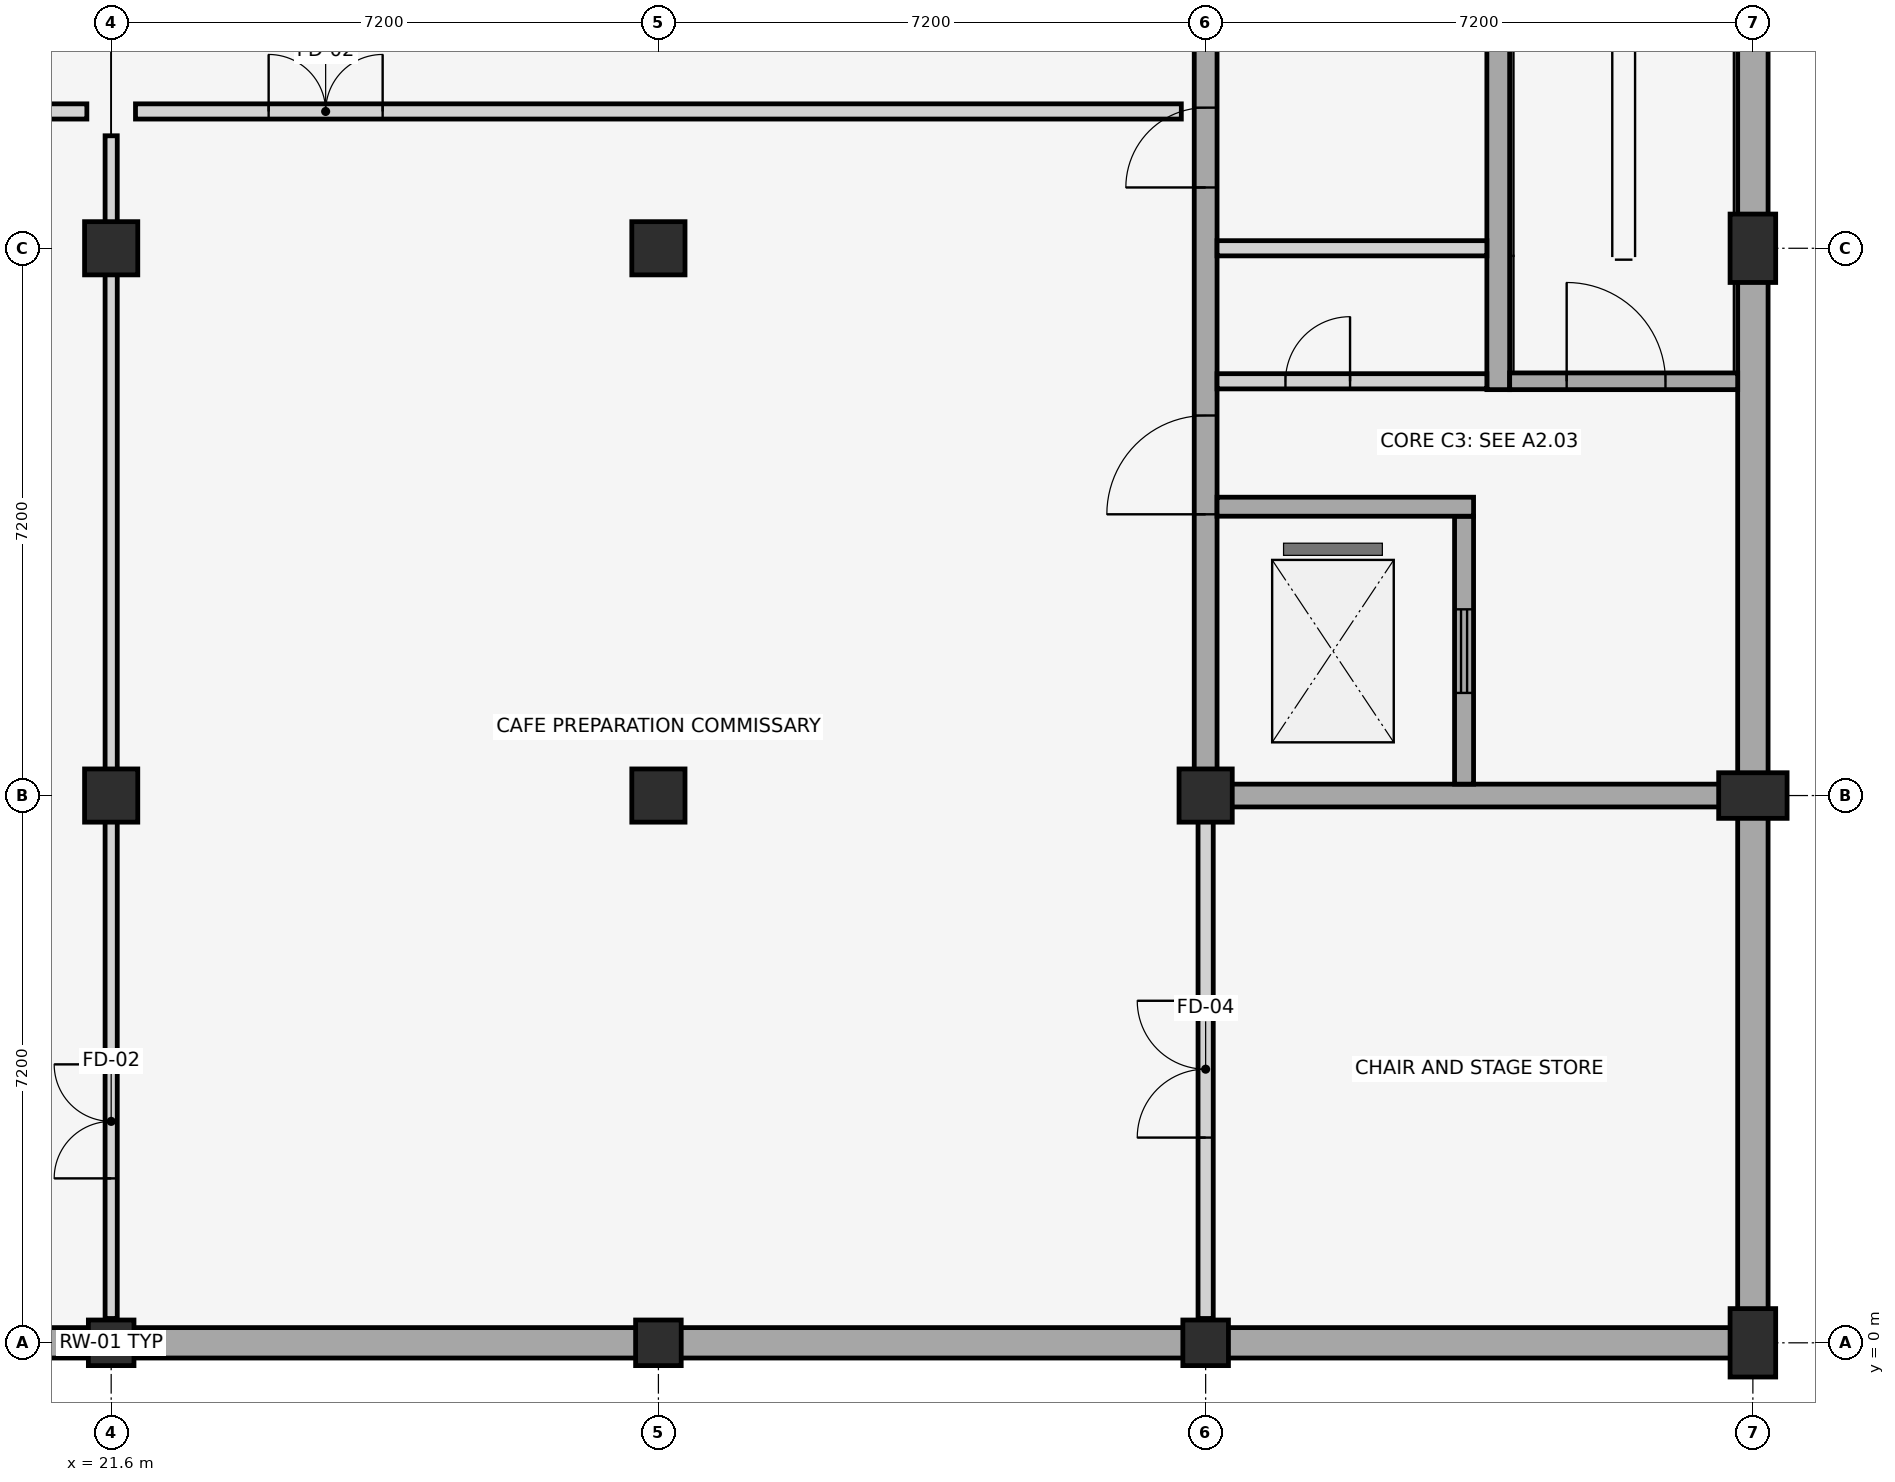
"""IFC4 building model, lengths in metres.
Left out: names, types, materials, properties, quantities, classifications, styles, units other than length and angle.
Written with IfcOpenShell. Run it as: python <this file> out.ifc"""

import sys

from ifc_helpers import new_model, si_unit, direction, frame, frame_2d, origin, origin_2d, place, context, subcontext, project, spatial, rectangle, extrude, element, fill, save


model = new_model("IFC4")
c1 = context("Model", 3, precision=1e-05, world=origin(), true_north=direction((0.0, 1.0)))
c2 = subcontext(c1, "Body", "Model", "MODEL_VIEW")
j1 = project(units=[si_unit("LENGTHUNIT", "METRE"), si_unit("PLANEANGLEUNIT", "RADIAN")], contexts=[c1])
p1 = place(None, origin())
s1 = spatial("IfcSite", under=j1, at=p1, CompositionType="ELEMENT")
p2 = place(p1, origin())
s2 = spatial("IfcBuilding", under=s1, at=p2, CompositionType="ELEMENT")
p3 = place(p2, frame((0.0, 0.0, -4.5)))
s3 = spatial("IfcBuildingStorey", under=s2, at=p3, CompositionType="ELEMENT", Elevation=-4.5)
p4 = place(p3, frame((-0.2, 0.0, 0.0), z_axis=(0.0, 0.0, 1.0), x_axis=(1.0, 0.0, 0.0)))
e1 = element("IfcWall", 1, at=p4, inside=s3, PredefinedType="USERDEFINED", context=c2, shape_type="SweptSolid", body=[
    extrude(rectangle(XDim=43.6, YDim=0.4, at=frame_2d((21.8, 0.0))), origin(), (0.0, 0.0, 1.0), 3.67),
])
p5 = place(p3, frame((43.2, 0.2, 0.0), z_axis=(0.0, 0.0, 1.0), x_axis=(0.0, 1.0, 0.0)))
e2 = element("IfcWall", 2, at=p5, inside=s3, PredefinedType="USERDEFINED", context=c2, shape_type="SweptSolid", body=[
    extrude(rectangle(XDim=28.4, YDim=0.4, at=frame_2d((14.2, 0.0))), origin(), (0.0, 0.0, 1.0), 3.67),
])
p6 = place(p3, frame((21.6, 0.0, -0.45), z_axis=(0.0, 0.0, 1.0), x_axis=(0.0, 1.0, 0.0)))
e3 = element("IfcColumn", 3, at=p6, inside=s3, PredefinedType="COLUMN", context=c2, shape_type="SweptSolid", body=[
    extrude(rectangle(XDim=0.6, YDim=0.6, at=origin_2d()), origin(), (0.0, 0.0, 1.0), 4.95),
])
for number, where, z_axis, x_axis in (
    (4, (21.6, 7.2, -0.45), (0.0, 0.0, 1.0), (1.0, 0.0, 0.0)),
    (5, (21.6, 14.4, -0.45), (0.0, 0.0, 1.0), (0.0, 1.0, 0.0)),
):
    element("IfcColumn", number, at=place(p3, frame(where, z_axis=z_axis, x_axis=x_axis)), inside=s3, PredefinedType="COLUMN", context=c2, shape_type="SweptSolid", body=[
        extrude(rectangle(XDim=0.7, YDim=0.7, at=origin_2d()), origin(), (0.0, 0.0, 1.0), 4.95),
    ])
p7 = place(p3, frame((28.8, 0.0, -0.45), z_axis=(0.0, 0.0, 1.0), x_axis=(1.0, 0.0, 0.0)))
e6 = element("IfcColumn", 6, at=p7, inside=s3, PredefinedType="COLUMN", context=c2, shape_type="SweptSolid", body=[
    extrude(rectangle(XDim=0.6, YDim=0.6, at=origin_2d()), origin(), (0.0, 0.0, 1.0), 4.95),
])
for number, where, z_axis, x_axis in (
    (7, (28.8, 7.2, -0.45), (0.0, 0.0, 1.0), (0.0, 1.0, 0.0)),
    (8, (28.8, 14.4, -0.45), (0.0, 0.0, 1.0), (1.0, 0.0, 0.0)),
):
    element("IfcColumn", number, at=place(p3, frame(where, z_axis=z_axis, x_axis=x_axis)), inside=s3, PredefinedType="COLUMN", context=c2, shape_type="SweptSolid", body=[
        extrude(rectangle(XDim=0.7, YDim=0.7, at=origin_2d()), origin(), (0.0, 0.0, 1.0), 4.95),
    ])
p8 = place(p3, frame((36.0, 0.0, -0.45), z_axis=(0.0, 0.0, 1.0), x_axis=(0.0, 1.0, 0.0)))
e9 = element("IfcColumn", 9, at=p8, inside=s3, PredefinedType="COLUMN", context=c2, shape_type="SweptSolid", body=[
    extrude(rectangle(XDim=0.6, YDim=0.6, at=origin_2d()), origin(), (0.0, 0.0, 1.0), 4.95),
])
p9 = place(p3, frame((36.0, 7.2, -0.45), z_axis=(0.0, 0.0, 1.0), x_axis=(1.0, 0.0, 0.0)))
e10 = element("IfcColumn", 10, at=p9, inside=s3, PredefinedType="COLUMN", context=c2, shape_type="SweptSolid", body=[
    extrude(rectangle(XDim=0.7, YDim=0.7, at=origin_2d()), origin(), (0.0, 0.0, 1.0), 4.95),
])
for number, where, z_axis, x_axis in (
    (11, (43.2, 0.0, -0.45), (0.0, 0.0, 1.0), (1.0, 0.0, 0.0)),
    (12, (43.2, 7.2, -0.45), (0.0, 0.0, 1.0), (0.0, 1.0, 0.0)),
    (13, (43.2, 14.4, -0.45), (0.0, 0.0, 1.0), (1.0, 0.0, 0.0)),
):
    element("IfcColumn", number, at=place(p3, frame(where, z_axis=z_axis, x_axis=x_axis)), inside=s3, PredefinedType="PILASTER", context=c2, shape_type="SweptSolid", body=[
        extrude(rectangle(XDim=0.6, YDim=0.9, at=origin_2d()), origin(), (0.0, 0.0, 1.0), 4.95),
    ])
p10 = place(p3, frame((35.85, 7.2, 0.0), z_axis=(0.0, 0.0, 1.0), x_axis=(1.0, 0.0, 0.0)))
e14 = element("IfcWall", 14, at=p10, inside=s3, PredefinedType="SHEAR", context=c2, shape_type="SweptSolid", body=[
    extrude(rectangle(XDim=7.15, YDim=0.3, at=frame_2d((3.575, 0.0))), origin(), (0.0, 0.0, 1.0), 4.25),
])
p11 = place(p3, frame((36.0, 7.35, 0.0), z_axis=(0.0, 0.0, 1.0), x_axis=(0.0, 1.0, 0.0)))
e15 = element("IfcWall", 15, at=p11, inside=s3, PredefinedType="SHEAR", context=c2, shape_type="SweptSolid", body=[
    extrude(rectangle(XDim=14.1, YDim=0.3, at=frame_2d((7.05, 0.0))), origin(), (0.0, 0.0, 1.0), 4.25),
])
p12 = place(p11, frame((3.55, 0.0, 0.0)))
e16 = element("IfcOpeningElement", 16, at=p12, cuts=e15, PredefinedType="OPENING", context=c2, shape_type="SweptSolid", body=[
    extrude(rectangle(XDim=1.3, YDim=2.2, at=frame_2d((0.65, 1.1))), frame((0.0, 0.16, 0.0), z_axis=(0.0, -1.0, 0.0), x_axis=(1.0, 0.0, 0.0)), (0.0, 0.0, 1.0), 0.32),
])
p13 = place(p11, frame((7.85, 0.0, 0.0)))
e17 = element("IfcOpeningElement", 17, at=p13, cuts=e15, PredefinedType="OPENING", context=c2, shape_type="SweptSolid", body=[
    extrude(rectangle(XDim=1.05, YDim=2.15, at=frame_2d((0.525, 1.075))), frame((0.0, 0.16, 0.0), z_axis=(0.0, -1.0, 0.0), x_axis=(1.0, 0.0, 0.0)), (0.0, 0.0, 1.0), 0.32),
])
p14 = place(p11, frame((10.55, 0.0, 0.0)))
e18 = element("IfcOpeningElement", 18, at=p14, cuts=e15, PredefinedType="OPENING", context=c2, shape_type="SweptSolid", body=[
    extrude(rectangle(XDim=1.0, YDim=2.15, at=frame_2d((0.5, 1.075))), frame((0.0, 0.16, 0.0), z_axis=(0.0, -1.0, 0.0), x_axis=(1.0, 0.0, 0.0)), (0.0, 0.0, 1.0), 0.32),
])
p15 = place(p3, frame((39.4, 7.35, 0.0), z_axis=(0.0, 0.0, 1.0), x_axis=(0.0, 1.0, 0.0)))
e19 = element("IfcWall", 19, at=p15, inside=s3, PredefinedType="SHEAR", context=c2, shape_type="SweptSolid", body=[
    extrude(rectangle(XDim=3.525, YDim=0.25, at=frame_2d((1.762, 0.0))), origin(), (0.0, 0.0, 1.0), 4.25),
])
p16 = place(p15, frame((1.2, 0.0, 0.0)))
e20 = element("IfcOpeningElement", 20, at=p16, cuts=e19, PredefinedType="OPENING", context=c2, shape_type="SweptSolid", body=[
    extrude(rectangle(XDim=1.1, YDim=2.15, at=frame_2d((0.55, 1.075))), frame((0.0, 0.135, 0.0), z_axis=(0.0, -1.0, 0.0), x_axis=(1.0, 0.0, 0.0)), (0.0, 0.0, 1.0), 0.27),
])
p17 = place(p3, frame((39.85, 12.54, 0.0), z_axis=(0.0, 0.0, 1.0), x_axis=(0.0, 1.0, 0.0)))
e21 = element("IfcWall", 21, at=p17, inside=s3, PredefinedType="SHEAR", context=c2, shape_type="SweptSolid", body=[
    extrude(rectangle(XDim=8.91, YDim=0.3, at=frame_2d((4.455, 0.0))), origin(), (0.0, 0.0, 1.0), 4.25),
])
p18 = place(p3, frame((36.15, 12.65, 0.0), z_axis=(0.0, 0.0, 1.0), x_axis=(1.0, 0.0, 0.0)))
e22 = element("IfcWall", 22, at=p18, inside=s3, PredefinedType="PLUMBINGWALL", context=c2, shape_type="SweptSolid", body=[
    extrude(rectangle(XDim=3.55, YDim=0.2, at=frame_2d((1.775, 0.0))), origin(), (0.0, 0.0, 1.0), 3.67),
])
p19 = place(p18, frame((0.9, 0.0, 0.0)))
e23 = element("IfcOpeningElement", 23, at=p19, cuts=e22, PredefinedType="OPENING", context=c2, shape_type="SweptSolid", body=[
    extrude(rectangle(XDim=0.85, YDim=2.05, at=frame_2d((0.425, 1.025))), frame((0.0, 0.11, 0.0), z_axis=(0.0, -1.0, 0.0), x_axis=(1.0, 0.0, 0.0)), (0.0, 0.0, 1.0), 0.22),
])
p20 = place(p3, frame((40.0, 12.65, 0.0), z_axis=(0.0, 0.0, 1.0), x_axis=(1.0, 0.0, 0.0)))
e24 = element("IfcWall", 24, at=p20, inside=s3, PredefinedType="SHEAR", context=c2, shape_type="SweptSolid", body=[
    extrude(rectangle(XDim=3.0, YDim=0.22, at=frame_2d((1.5, 0.0))), origin(), (0.0, 0.0, 1.0), 4.25),
])
p21 = place(p20, frame((0.75, 0.0, 0.0)))
e25 = element("IfcOpeningElement", 25, at=p21, cuts=e24, PredefinedType="OPENING", context=c2, shape_type="SweptSolid", body=[
    extrude(rectangle(XDim=1.3, YDim=2.2, at=frame_2d((0.65, 1.1))), frame((0.0, 0.12, 0.0), z_axis=(0.0, -1.0, 0.0), x_axis=(1.0, 0.0, 0.0)), (0.0, 0.0, 1.0), 0.24),
])
p22 = place(p3, frame((36.15, 11.0, 0.0), z_axis=(0.0, 0.0, 1.0), x_axis=(1.0, 0.0, 0.0)))
e26 = element("IfcWall", 26, at=p22, inside=s3, PredefinedType="SHEAR", context=c2, shape_type="SweptSolid", body=[
    extrude(rectangle(XDim=3.375, YDim=0.25, at=frame_2d((1.688, 0.0))), origin(), (0.0, 0.0, 1.0), 4.25),
])
p23 = place(p3, frame((36.15, 14.4, 0.0), z_axis=(0.0, 0.0, 1.0), x_axis=(1.0, 0.0, 0.0)))
e27 = element("IfcWall", 27, at=p23, inside=s3, PredefinedType="PLUMBINGWALL", context=c2, shape_type="SweptSolid", body=[
    extrude(rectangle(XDim=3.55, YDim=0.2, at=frame_2d((1.775, 0.0))), origin(), (0.0, 0.0, 1.0), 3.67),
])
p24 = place(p3, frame((7.52, 16.2, 0.0), z_axis=(0.0, 0.0, 1.0), x_axis=(1.0, 0.0, 0.0)))
e28 = element("IfcWall", 28, at=p24, inside=s3, PredefinedType="PARTITIONING", context=c2, shape_type="SweptSolid", body=[
    extrude(rectangle(XDim=13.76, YDim=0.2, at=frame_2d((6.88, 0.0))), origin(), (0.0, 0.0, 1.0), 3.45),
])
p25 = place(p24, frame((1.752, 0.0, 0.0)))
e29 = element("IfcOpeningElement", 29, at=p25, cuts=e28, PredefinedType="OPENING", context=c2, shape_type="SweptSolid", body=[
    extrude(rectangle(XDim=1.5, YDim=2.25, at=frame_2d((0.75, 1.125))), frame((0.0, 0.11, 0.0), z_axis=(0.0, -1.0, 0.0), x_axis=(1.0, 0.0, 0.0)), (0.0, 0.0, 1.0), 0.22),
])
p26 = place(p3, frame((21.92, 16.2, 0.0), z_axis=(0.0, 0.0, 1.0), x_axis=(1.0, 0.0, 0.0)))
e30 = element("IfcWall", 30, at=p26, inside=s3, PredefinedType="PARTITIONING", context=c2, shape_type="SweptSolid", body=[
    extrude(rectangle(XDim=13.76, YDim=0.2, at=frame_2d((6.88, 0.0))), origin(), (0.0, 0.0, 1.0), 3.45),
])
p27 = place(p26, frame((1.752, 0.0, 0.0)))
e31 = element("IfcOpeningElement", 31, at=p27, cuts=e30, PredefinedType="OPENING", context=c2, shape_type="SweptSolid", body=[
    extrude(rectangle(XDim=1.5, YDim=2.25, at=frame_2d((0.75, 1.125))), frame((0.0, 0.11, 0.0), z_axis=(0.0, -1.0, 0.0), x_axis=(1.0, 0.0, 0.0)), (0.0, 0.0, 1.0), 0.22),
])
p28 = place(p3, frame((21.6, 0.32, 0.0), z_axis=(0.0, 0.0, 1.0), x_axis=(0.0, 1.0, 0.0)))
e32 = element("IfcWall", 32, at=p28, inside=s3, PredefinedType="PARTITIONING", context=c2, shape_type="SweptSolid", body=[
    extrude(rectangle(XDim=15.56, YDim=0.16, at=frame_2d((7.78, 0.0))), origin(), (0.0, 0.0, 1.0), 3.45),
])
p29 = place(p28, frame((1.843, 0.0, 0.0)))
e33 = element("IfcOpeningElement", 33, at=p29, cuts=e32, PredefinedType="OPENING", context=c2, shape_type="SweptSolid", body=[
    extrude(rectangle(XDim=1.5, YDim=2.25, at=frame_2d((0.75, 1.125))), frame((0.0, 0.09, 0.0), z_axis=(0.0, -1.0, 0.0), x_axis=(1.0, 0.0, 0.0)), (0.0, 0.0, 1.0), 0.18),
])
p30 = place(p3, frame((36.0, 0.32, 0.0), z_axis=(0.0, 0.0, 1.0), x_axis=(0.0, 1.0, 0.0)))
e34 = element("IfcWall", 34, at=p30, inside=s3, PredefinedType="PARTITIONING", context=c2, shape_type="SweptSolid", body=[
    extrude(rectangle(XDim=6.56, YDim=0.2, at=frame_2d((3.28, 0.0))), origin(), (0.0, 0.0, 1.0), 3.45),
])
p31 = place(p30, frame((2.38, 0.0, 0.0)))
e35 = element("IfcOpeningElement", 35, at=p31, cuts=e34, PredefinedType="OPENING", context=c2, shape_type="SweptSolid", body=[
    extrude(rectangle(XDim=1.8, YDim=2.4, at=frame_2d((0.9, 1.2))), frame((0.0, 0.11, 0.0), z_axis=(0.0, -1.0, 0.0), x_axis=(1.0, 0.0, 0.0)), (0.0, 0.0, 1.0), 0.22),
])
p32 = place(p12, origin())
e36 = element("IfcDoor", 36, at=p32, inside=s3, OperationType="SINGLE_SWING_LEFT", PredefinedType="DOOR", context=c2, shape_type="SweptSolid", body=[
    extrude(rectangle(XDim=1.3, YDim=2.2, at=frame_2d((0.65, 1.1))), frame((0.0, 0.025, 0.0), z_axis=(0.0, -1.0, 0.0), x_axis=(1.0, 0.0, 0.0)), (0.0, 0.0, 1.0), 0.05),
])
fill(e16, e36)
p33 = place(p13, origin())
e37 = element("IfcDoor", 37, at=p33, inside=s3, OperationType="SINGLE_SWING_LEFT", PredefinedType="DOOR", context=c2, shape_type="SweptSolid", body=[
    extrude(rectangle(XDim=1.05, YDim=2.15, at=frame_2d((0.525, 1.075))), frame((0.0, 0.025, 0.0), z_axis=(0.0, -1.0, 0.0), x_axis=(1.0, 0.0, 0.0)), (0.0, 0.0, 1.0), 0.05),
])
fill(e17, e37)
p34 = place(p16, origin())
e38 = element("IfcDoor", 38, at=p34, inside=s3, OperationType="SLIDING_TO_LEFT", PredefinedType="DOOR", context=c2, shape_type="SweptSolid", body=[
    extrude(rectangle(XDim=1.1, YDim=2.15, at=frame_2d((0.55, 1.075))), frame((0.0, 0.025, 0.0), z_axis=(0.0, -1.0, 0.0), x_axis=(1.0, 0.0, 0.0)), (0.0, 0.0, 1.0), 0.05),
])
fill(e20, e38)
p35 = place(p19, origin())
e39 = element("IfcDoor", 39, at=p35, inside=s3, OperationType="SINGLE_SWING_RIGHT", PredefinedType="TRAPDOOR", context=c2, shape_type="SweptSolid", body=[
    extrude(rectangle(XDim=0.85, YDim=2.05, at=frame_2d((0.425, 1.025))), frame((0.0, 0.025, 0.0), z_axis=(0.0, -1.0, 0.0), x_axis=(1.0, 0.0, 0.0)), (0.0, 0.0, 1.0), 0.05),
])
fill(e23, e39)
p36 = place(p21, origin())
e40 = element("IfcDoor", 40, at=p36, inside=s3, OperationType="SINGLE_SWING_LEFT", PredefinedType="DOOR", context=c2, shape_type="SweptSolid", body=[
    extrude(rectangle(XDim=1.3, YDim=2.2, at=frame_2d((0.65, 1.1))), frame((0.0, 0.025, 0.0), z_axis=(0.0, -1.0, 0.0), x_axis=(1.0, 0.0, 0.0)), (0.0, 0.0, 1.0), 0.05),
])
fill(e25, e40)
p37 = place(p27, origin())
e41 = element("IfcDoor", 41, at=p37, inside=s3, OperationType="DOUBLE_DOOR_SINGLE_SWING", PredefinedType="DOOR", context=c2, shape_type="SweptSolid", body=[
    extrude(rectangle(XDim=1.5, YDim=2.25, at=frame_2d((0.75, 1.125))), frame((0.0, 0.025, 0.0), z_axis=(0.0, -1.0, 0.0), x_axis=(1.0, 0.0, 0.0)), (0.0, 0.0, 1.0), 0.05),
])
fill(e31, e41)
p38 = place(p29, origin())
e42 = element("IfcDoor", 42, at=p38, inside=s3, OperationType="DOUBLE_DOOR_SINGLE_SWING", PredefinedType="DOOR", context=c2, shape_type="SweptSolid", body=[
    extrude(rectangle(XDim=1.5, YDim=2.25, at=frame_2d((0.75, 1.125))), frame((0.0, 0.025, 0.0), z_axis=(0.0, -1.0, 0.0), x_axis=(1.0, 0.0, 0.0)), (0.0, 0.0, 1.0), 0.05),
])
fill(e33, e42)
p39 = place(p31, origin())
e43 = element("IfcDoor", 43, at=p39, inside=s3, OperationType="DOUBLE_DOOR_SINGLE_SWING", PredefinedType="DOOR", context=c2, shape_type="SweptSolid", body=[
    extrude(rectangle(XDim=1.8, YDim=2.4, at=frame_2d((0.9, 1.2))), frame((0.0, 0.025, 0.0), z_axis=(0.0, -1.0, 0.0), x_axis=(1.0, 0.0, 0.0)), (0.0, 0.0, 1.0), 0.05),
])
fill(e35, e43)
save(model, sys.argv[1])
